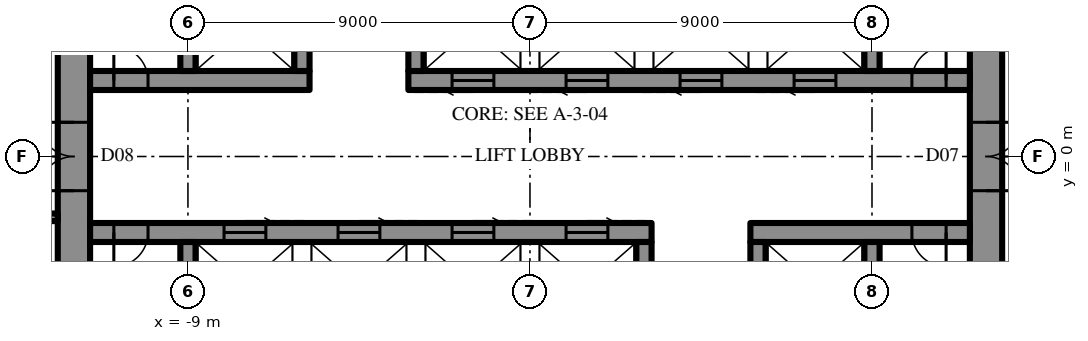
"""IFC4 building model, lengths in metres.
Left out: names, types, materials, properties, quantities, classifications, styles, units other than length and angle.
Written with IfcOpenShell. Run it as: python <this file> out.ifc"""

import sys

from ifc_helpers import new_model, si_unit, direction, frame, frame_2d, origin, place, context, subcontext, project, spatial, rectangle, extrude, element, fill, save


model = new_model("IFC4")
c1 = context("Model", 3, precision=1e-05, world=origin(), true_north=direction((0.0, 1.0)))
c2 = subcontext(c1, "Body", "Model", "MODEL_VIEW")
j1 = project(units=[si_unit("LENGTHUNIT", "METRE"), si_unit("PLANEANGLEUNIT", "RADIAN")], contexts=[c1])
p1 = place(None, origin())
s1 = spatial("IfcSite", under=j1, at=p1, CompositionType="ELEMENT")
p2 = place(p1, origin())
s2 = spatial("IfcBuilding", under=s1, at=p2, CompositionType="ELEMENT")
p3 = place(p2, frame((0.0, 0.0, 361.9)))
s3 = spatial("IfcBuildingStorey", under=s2, at=p3, CompositionType="ELEMENT", Elevation=361.9)
p4 = place(p3, frame((12.0, -10.7, 0.0), z_axis=(0.0, 0.0, 1.0), x_axis=(0.0, 1.0, 0.0)))
e1 = element("IfcWall", 1, at=p4, inside=s3, PredefinedType="SHEAR", context=c2, shape_type="SweptSolid", body=[
    extrude(rectangle(XDim=21.4, YDim=0.85, at=frame_2d((10.7, 0.0))), origin(), (0.0, 0.0, 1.0), 4.2),
])
p5 = place(p4, frame((9.8, 0.0, 0.0)))
e2 = element("IfcOpeningElement", 2, at=p5, cuts=e1, PredefinedType="OPENING", context=c2, shape_type="SweptSolid", body=[
    extrude(rectangle(XDim=1.8, YDim=2.4, at=frame_2d((0.9, 1.2))), frame((0.0, 0.435, 0.0), z_axis=(0.0, -1.0, 0.0), x_axis=(1.0, 0.0, 0.0)), (0.0, 0.0, 1.0), 0.87),
])
p6 = place(p3, frame((-12.0, 10.7, 0.0), z_axis=(0.0, 0.0, 1.0), x_axis=(0.0, -1.0, 0.0)))
e3 = element("IfcWall", 3, at=p6, inside=s3, PredefinedType="SHEAR", context=c2, shape_type="SweptSolid", body=[
    extrude(rectangle(XDim=21.4, YDim=0.85, at=frame_2d((10.7, 0.0))), origin(), (0.0, 0.0, 1.0), 4.2),
])
p7 = place(p6, frame((9.8, 0.0, 0.0)))
e4 = element("IfcOpeningElement", 4, at=p7, cuts=e3, PredefinedType="OPENING", context=c2, shape_type="SweptSolid", body=[
    extrude(rectangle(XDim=1.8, YDim=2.4, at=frame_2d((0.9, 1.2))), frame((0.0, 0.435, 0.0), z_axis=(0.0, -1.0, 0.0), x_axis=(1.0, 0.0, 0.0)), (0.0, 0.0, 1.0), 0.87),
])
p8 = place(p3, frame((-11.575, 2.0, 0.0), z_axis=(0.0, 0.0, 1.0), x_axis=(1.0, 0.0, 0.0)))
e5 = element("IfcWall", 5, at=p8, inside=s3, PredefinedType="SHEAR", context=c2, shape_type="SweptSolid", body=[
    extrude(rectangle(XDim=5.775, YDim=0.5, at=frame_2d((2.887, 0.0))), origin(), (0.0, 0.0, 1.0), 4.2),
])
p9 = place(p8, frame((0.625, 0.0, 0.0)))
e6 = element("IfcOpeningElement", 6, at=p9, cuts=e5, PredefinedType="OPENING", context=c2, shape_type="SweptSolid", body=[
    extrude(rectangle(XDim=0.9, YDim=2.2, at=frame_2d((0.45, 1.1))), frame((0.0, 0.26, 0.0), z_axis=(0.0, -1.0, 0.0), x_axis=(1.0, 0.0, 0.0)), (0.0, 0.0, 1.0), 0.52),
])
p10 = place(p3, frame((-3.2, 2.0, 0.0), z_axis=(0.0, 0.0, 1.0), x_axis=(1.0, 0.0, 0.0)))
e7 = element("IfcWall", 7, at=p10, inside=s3, PredefinedType="SHEAR", context=c2, shape_type="SweptSolid", body=[
    extrude(rectangle(XDim=14.775, YDim=0.5, at=frame_2d((7.387, 0.0))), origin(), (0.0, 0.0, 1.0), 4.2),
])
p11 = place(p10, frame((13.25, 0.0, 0.0)))
e8 = element("IfcOpeningElement", 8, at=p11, cuts=e7, PredefinedType="OPENING", context=c2, shape_type="SweptSolid", body=[
    extrude(rectangle(XDim=0.9, YDim=2.2, at=frame_2d((0.45, 1.1))), frame((0.0, 0.26, 0.0), z_axis=(0.0, -1.0, 0.0), x_axis=(1.0, 0.0, 0.0)), (0.0, 0.0, 1.0), 0.52),
])
p12 = place(p10, frame((1.15, 0.0, 0.0)))
e9 = element("IfcOpeningElement", 9, at=p12, cuts=e7, PredefinedType="OPENING", context=c2, shape_type="SweptSolid", body=[
    extrude(rectangle(XDim=1.1, YDim=2.2, at=frame_2d((0.55, 1.1))), frame((0.0, 0.26, 0.0), z_axis=(0.0, -1.0, 0.0), x_axis=(1.0, 0.0, 0.0)), (0.0, 0.0, 1.0), 0.52),
])
p13 = place(p10, frame((4.15, 0.0, 0.0)))
e10 = element("IfcOpeningElement", 10, at=p13, cuts=e7, PredefinedType="OPENING", context=c2, shape_type="SweptSolid", body=[
    extrude(rectangle(XDim=1.1, YDim=2.2, at=frame_2d((0.55, 1.1))), frame((0.0, 0.26, 0.0), z_axis=(0.0, -1.0, 0.0), x_axis=(1.0, 0.0, 0.0)), (0.0, 0.0, 1.0), 0.52),
])
p14 = place(p10, frame((7.15, 0.0, 0.0)))
e11 = element("IfcOpeningElement", 11, at=p14, cuts=e7, PredefinedType="OPENING", context=c2, shape_type="SweptSolid", body=[
    extrude(rectangle(XDim=1.1, YDim=2.2, at=frame_2d((0.55, 1.1))), frame((0.0, 0.26, 0.0), z_axis=(0.0, -1.0, 0.0), x_axis=(1.0, 0.0, 0.0)), (0.0, 0.0, 1.0), 0.52),
])
p15 = place(p10, frame((10.15, 0.0, 0.0)))
e12 = element("IfcOpeningElement", 12, at=p15, cuts=e7, PredefinedType="OPENING", context=c2, shape_type="SweptSolid", body=[
    extrude(rectangle(XDim=1.1, YDim=2.2, at=frame_2d((0.55, 1.1))), frame((0.0, 0.26, 0.0), z_axis=(0.0, -1.0, 0.0), x_axis=(1.0, 0.0, 0.0)), (0.0, 0.0, 1.0), 0.52),
])
for number, where, z_axis, x_axis in (
    (13, (-9.0, 2.25, 0.0), (0.0, 0.0, 1.0), (0.0, 1.0, 0.0)),
    (14, (-6.0, 2.25, 0.0), (0.0, 0.0, 1.0), (0.0, 1.0, 0.0)),
    (15, (-3.0, 2.25, 0.0), (0.0, 0.0, 1.0), (0.0, 1.0, 0.0)),
    (16, (9.0, 2.25, 0.0), (0.0, 0.0, 1.0), (0.0, 1.0, 0.0)),
):
    element("IfcWall", number, at=place(p3, frame(where, z_axis=z_axis, x_axis=x_axis)), inside=s3, PredefinedType="SHEAR", context=c2, shape_type="SweptSolid", body=[
        extrude(rectangle(XDim=2.3, YDim=0.4, at=frame_2d((1.15, 0.0))), origin(), (0.0, 0.0, 1.0), 4.2),
    ])
p16 = place(p3, frame((11.575, -2.0, 0.0), z_axis=(0.0, 0.0, 1.0), x_axis=(-1.0, 0.0, 0.0)))
e17 = element("IfcWall", 17, at=p16, inside=s3, PredefinedType="SHEAR", context=c2, shape_type="SweptSolid", body=[
    extrude(rectangle(XDim=5.775, YDim=0.5, at=frame_2d((2.887, 0.0))), origin(), (0.0, 0.0, 1.0), 4.2),
])
p17 = place(p16, frame((0.625, 0.0, 0.0)))
e18 = element("IfcOpeningElement", 18, at=p17, cuts=e17, PredefinedType="OPENING", context=c2, shape_type="SweptSolid", body=[
    extrude(rectangle(XDim=0.9, YDim=2.2, at=frame_2d((0.45, 1.1))), frame((0.0, 0.26, 0.0), z_axis=(0.0, -1.0, 0.0), x_axis=(1.0, 0.0, 0.0)), (0.0, 0.0, 1.0), 0.52),
])
p18 = place(p3, frame((3.2, -2.0, 0.0), z_axis=(0.0, 0.0, 1.0), x_axis=(-1.0, 0.0, 0.0)))
e19 = element("IfcWall", 19, at=p18, inside=s3, PredefinedType="SHEAR", context=c2, shape_type="SweptSolid", body=[
    extrude(rectangle(XDim=14.775, YDim=0.5, at=frame_2d((7.387, 0.0))), origin(), (0.0, 0.0, 1.0), 4.2),
])
p19 = place(p18, frame((13.25, 0.0, 0.0)))
e20 = element("IfcOpeningElement", 20, at=p19, cuts=e19, PredefinedType="OPENING", context=c2, shape_type="SweptSolid", body=[
    extrude(rectangle(XDim=0.9, YDim=2.2, at=frame_2d((0.45, 1.1))), frame((0.0, 0.26, 0.0), z_axis=(0.0, -1.0, 0.0), x_axis=(1.0, 0.0, 0.0)), (0.0, 0.0, 1.0), 0.52),
])
p20 = place(p18, frame((1.15, 0.0, 0.0)))
e21 = element("IfcOpeningElement", 21, at=p20, cuts=e19, PredefinedType="OPENING", context=c2, shape_type="SweptSolid", body=[
    extrude(rectangle(XDim=1.1, YDim=2.2, at=frame_2d((0.55, 1.1))), frame((0.0, 0.26, 0.0), z_axis=(0.0, -1.0, 0.0), x_axis=(1.0, 0.0, 0.0)), (0.0, 0.0, 1.0), 0.52),
])
p21 = place(p18, frame((4.15, 0.0, 0.0)))
e22 = element("IfcOpeningElement", 22, at=p21, cuts=e19, PredefinedType="OPENING", context=c2, shape_type="SweptSolid", body=[
    extrude(rectangle(XDim=1.1, YDim=2.2, at=frame_2d((0.55, 1.1))), frame((0.0, 0.26, 0.0), z_axis=(0.0, -1.0, 0.0), x_axis=(1.0, 0.0, 0.0)), (0.0, 0.0, 1.0), 0.52),
])
p22 = place(p18, frame((7.15, 0.0, 0.0)))
e23 = element("IfcOpeningElement", 23, at=p22, cuts=e19, PredefinedType="OPENING", context=c2, shape_type="SweptSolid", body=[
    extrude(rectangle(XDim=1.1, YDim=2.2, at=frame_2d((0.55, 1.1))), frame((0.0, 0.26, 0.0), z_axis=(0.0, -1.0, 0.0), x_axis=(1.0, 0.0, 0.0)), (0.0, 0.0, 1.0), 0.52),
])
p23 = place(p18, frame((10.15, 0.0, 0.0)))
e24 = element("IfcOpeningElement", 24, at=p23, cuts=e19, PredefinedType="OPENING", context=c2, shape_type="SweptSolid", body=[
    extrude(rectangle(XDim=1.1, YDim=2.2, at=frame_2d((0.55, 1.1))), frame((0.0, 0.26, 0.0), z_axis=(0.0, -1.0, 0.0), x_axis=(1.0, 0.0, 0.0)), (0.0, 0.0, 1.0), 0.52),
])
for number, where, z_axis, x_axis in (
    (25, (9.0, -2.25, 0.0), (0.0, 0.0, 1.0), (0.0, -1.0, 0.0)),
    (26, (6.0, -2.25, 0.0), (0.0, 0.0, 1.0), (0.0, -1.0, 0.0)),
    (27, (3.0, -2.25, 0.0), (0.0, 0.0, 1.0), (0.0, -1.0, 0.0)),
    (28, (-9.0, -2.25, 0.0), (0.0, 0.0, 1.0), (0.0, -1.0, 0.0)),
):
    element("IfcWall", number, at=place(p3, frame(where, z_axis=z_axis, x_axis=x_axis)), inside=s3, PredefinedType="SHEAR", context=c2, shape_type="SweptSolid", body=[
        extrude(rectangle(XDim=2.3, YDim=0.4, at=frame_2d((1.15, 0.0))), origin(), (0.0, 0.0, 1.0), 4.2),
    ])
p24 = place(p3, frame((-12.425, -1.6, 0.0), z_axis=(0.0, 0.0, 1.0), x_axis=(-1.0, 0.0, 0.0)))
e29 = element("IfcWall", 29, at=p24, inside=s3, PredefinedType="PARTITIONING", context=c2, shape_type="SweptSolid", body=[
    extrude(rectangle(XDim=16.5, YDim=0.2, at=frame_2d((8.25, 0.0))), origin(), (0.0, 0.0, 1.0), 4.0),
])
p25 = place(p24, frame((1.15, 0.0, 0.0)))
e30 = element("IfcOpeningElement", 30, at=p25, cuts=e29, PredefinedType="OPENING", context=c2, shape_type="SweptSolid", body=[
    extrude(rectangle(XDim=1.0, YDim=2.2, at=frame_2d((0.5, 1.1))), frame((0.0, 0.11, 0.0), z_axis=(0.0, -1.0, 0.0), x_axis=(1.0, 0.0, 0.0)), (0.0, 0.0, 1.0), 0.22),
])
p26 = place(p5, frame((1.8, 0.0, 0.0), z_axis=(0.0, 0.0, 1.0), x_axis=(-1.0, 0.0, 0.0)))
e31 = element("IfcDoor", 31, at=p26, inside=s3, OperationType="DOUBLE_DOOR_SINGLE_SWING", PredefinedType="DOOR", context=c2, shape_type="SweptSolid", body=[
    extrude(rectangle(XDim=1.8, YDim=2.4, at=frame_2d((0.9, 1.2))), frame((0.0, 0.025, 0.0), z_axis=(0.0, -1.0, 0.0), x_axis=(1.0, 0.0, 0.0)), (0.0, 0.0, 1.0), 0.05),
])
fill(e2, e31)
p27 = place(p7, frame((1.8, 0.0, 0.0), z_axis=(0.0, 0.0, 1.0), x_axis=(-1.0, 0.0, 0.0)))
e32 = element("IfcDoor", 32, at=p27, inside=s3, OperationType="DOUBLE_DOOR_SINGLE_SWING", PredefinedType="DOOR", context=c2, shape_type="SweptSolid", body=[
    extrude(rectangle(XDim=1.8, YDim=2.4, at=frame_2d((0.9, 1.2))), frame((0.0, 0.025, 0.0), z_axis=(0.0, -1.0, 0.0), x_axis=(1.0, 0.0, 0.0)), (0.0, 0.0, 1.0), 0.05),
])
fill(e4, e32)
p28 = place(p9, origin())
e33 = element("IfcDoor", 33, at=p28, inside=s3, OperationType="SINGLE_SWING_RIGHT", PredefinedType="DOOR", context=c2, shape_type="SweptSolid", body=[
    extrude(rectangle(XDim=0.9, YDim=2.2, at=frame_2d((0.45, 1.1))), frame((0.0, 0.025, 0.0), z_axis=(0.0, -1.0, 0.0), x_axis=(1.0, 0.0, 0.0)), (0.0, 0.0, 1.0), 0.05),
])
fill(e6, e33)
p29 = place(p11, origin())
e34 = element("IfcDoor", 34, at=p29, inside=s3, OperationType="SINGLE_SWING_LEFT", PredefinedType="DOOR", context=c2, shape_type="SweptSolid", body=[
    extrude(rectangle(XDim=0.9, YDim=2.2, at=frame_2d((0.45, 1.1))), frame((0.0, 0.025, 0.0), z_axis=(0.0, -1.0, 0.0), x_axis=(1.0, 0.0, 0.0)), (0.0, 0.0, 1.0), 0.05),
])
fill(e8, e34)
p30 = place(p17, origin())
e35 = element("IfcDoor", 35, at=p30, inside=s3, OperationType="SINGLE_SWING_RIGHT", PredefinedType="DOOR", context=c2, shape_type="SweptSolid", body=[
    extrude(rectangle(XDim=0.9, YDim=2.2, at=frame_2d((0.45, 1.1))), frame((0.0, 0.025, 0.0), z_axis=(0.0, -1.0, 0.0), x_axis=(1.0, 0.0, 0.0)), (0.0, 0.0, 1.0), 0.05),
])
fill(e18, e35)
p31 = place(p19, origin())
e36 = element("IfcDoor", 36, at=p31, inside=s3, OperationType="SINGLE_SWING_LEFT", PredefinedType="DOOR", context=c2, shape_type="SweptSolid", body=[
    extrude(rectangle(XDim=0.9, YDim=2.2, at=frame_2d((0.45, 1.1))), frame((0.0, 0.025, 0.0), z_axis=(0.0, -1.0, 0.0), x_axis=(1.0, 0.0, 0.0)), (0.0, 0.0, 1.0), 0.05),
])
fill(e20, e36)
p32 = place(p12, frame((1.1, 0.0, 0.0), z_axis=(0.0, 0.0, 1.0), x_axis=(-1.0, 0.0, 0.0)))
e37 = element("IfcDoor", 37, at=p32, inside=s3, OperationType="SLIDING_TO_LEFT", PredefinedType="DOOR", context=c2, shape_type="SweptSolid", body=[
    extrude(rectangle(XDim=1.1, YDim=2.2, at=frame_2d((0.55, 1.1))), frame((0.0, 0.025, 0.0), z_axis=(0.0, -1.0, 0.0), x_axis=(1.0, 0.0, 0.0)), (0.0, 0.0, 1.0), 0.05),
])
fill(e9, e37)
p33 = place(p13, frame((1.1, 0.0, 0.0), z_axis=(0.0, 0.0, 1.0), x_axis=(-1.0, 0.0, 0.0)))
e38 = element("IfcDoor", 38, at=p33, inside=s3, OperationType="SLIDING_TO_LEFT", PredefinedType="DOOR", context=c2, shape_type="SweptSolid", body=[
    extrude(rectangle(XDim=1.1, YDim=2.2, at=frame_2d((0.55, 1.1))), frame((0.0, 0.025, 0.0), z_axis=(0.0, -1.0, 0.0), x_axis=(1.0, 0.0, 0.0)), (0.0, 0.0, 1.0), 0.05),
])
fill(e10, e38)
p34 = place(p14, frame((1.1, 0.0, 0.0), z_axis=(0.0, 0.0, 1.0), x_axis=(-1.0, 0.0, 0.0)))
e39 = element("IfcDoor", 39, at=p34, inside=s3, OperationType="SLIDING_TO_LEFT", PredefinedType="DOOR", context=c2, shape_type="SweptSolid", body=[
    extrude(rectangle(XDim=1.1, YDim=2.2, at=frame_2d((0.55, 1.1))), frame((0.0, 0.025, 0.0), z_axis=(0.0, -1.0, 0.0), x_axis=(1.0, 0.0, 0.0)), (0.0, 0.0, 1.0), 0.05),
])
fill(e11, e39)
p35 = place(p15, frame((1.1, 0.0, 0.0), z_axis=(0.0, 0.0, 1.0), x_axis=(-1.0, 0.0, 0.0)))
e40 = element("IfcDoor", 40, at=p35, inside=s3, OperationType="SLIDING_TO_LEFT", PredefinedType="DOOR", context=c2, shape_type="SweptSolid", body=[
    extrude(rectangle(XDim=1.1, YDim=2.2, at=frame_2d((0.55, 1.1))), frame((0.0, 0.025, 0.0), z_axis=(0.0, -1.0, 0.0), x_axis=(1.0, 0.0, 0.0)), (0.0, 0.0, 1.0), 0.05),
])
fill(e12, e40)
p36 = place(p20, frame((1.1, 0.0, 0.0), z_axis=(0.0, 0.0, 1.0), x_axis=(-1.0, 0.0, 0.0)))
e41 = element("IfcDoor", 41, at=p36, inside=s3, OperationType="SLIDING_TO_LEFT", PredefinedType="DOOR", context=c2, shape_type="SweptSolid", body=[
    extrude(rectangle(XDim=1.1, YDim=2.2, at=frame_2d((0.55, 1.1))), frame((0.0, 0.025, 0.0), z_axis=(0.0, -1.0, 0.0), x_axis=(1.0, 0.0, 0.0)), (0.0, 0.0, 1.0), 0.05),
])
fill(e21, e41)
p37 = place(p21, frame((1.1, 0.0, 0.0), z_axis=(0.0, 0.0, 1.0), x_axis=(-1.0, 0.0, 0.0)))
e42 = element("IfcDoor", 42, at=p37, inside=s3, OperationType="SLIDING_TO_LEFT", PredefinedType="DOOR", context=c2, shape_type="SweptSolid", body=[
    extrude(rectangle(XDim=1.1, YDim=2.2, at=frame_2d((0.55, 1.1))), frame((0.0, 0.025, 0.0), z_axis=(0.0, -1.0, 0.0), x_axis=(1.0, 0.0, 0.0)), (0.0, 0.0, 1.0), 0.05),
])
fill(e22, e42)
p38 = place(p22, frame((1.1, 0.0, 0.0), z_axis=(0.0, 0.0, 1.0), x_axis=(-1.0, 0.0, 0.0)))
e43 = element("IfcDoor", 43, at=p38, inside=s3, OperationType="SLIDING_TO_LEFT", PredefinedType="DOOR", context=c2, shape_type="SweptSolid", body=[
    extrude(rectangle(XDim=1.1, YDim=2.2, at=frame_2d((0.55, 1.1))), frame((0.0, 0.025, 0.0), z_axis=(0.0, -1.0, 0.0), x_axis=(1.0, 0.0, 0.0)), (0.0, 0.0, 1.0), 0.05),
])
fill(e23, e43)
p39 = place(p23, frame((1.1, 0.0, 0.0), z_axis=(0.0, 0.0, 1.0), x_axis=(-1.0, 0.0, 0.0)))
e44 = element("IfcDoor", 44, at=p39, inside=s3, OperationType="SLIDING_TO_LEFT", PredefinedType="DOOR", context=c2, shape_type="SweptSolid", body=[
    extrude(rectangle(XDim=1.1, YDim=2.2, at=frame_2d((0.55, 1.1))), frame((0.0, 0.025, 0.0), z_axis=(0.0, -1.0, 0.0), x_axis=(1.0, 0.0, 0.0)), (0.0, 0.0, 1.0), 0.05),
])
fill(e24, e44)
save(model, sys.argv[1])
